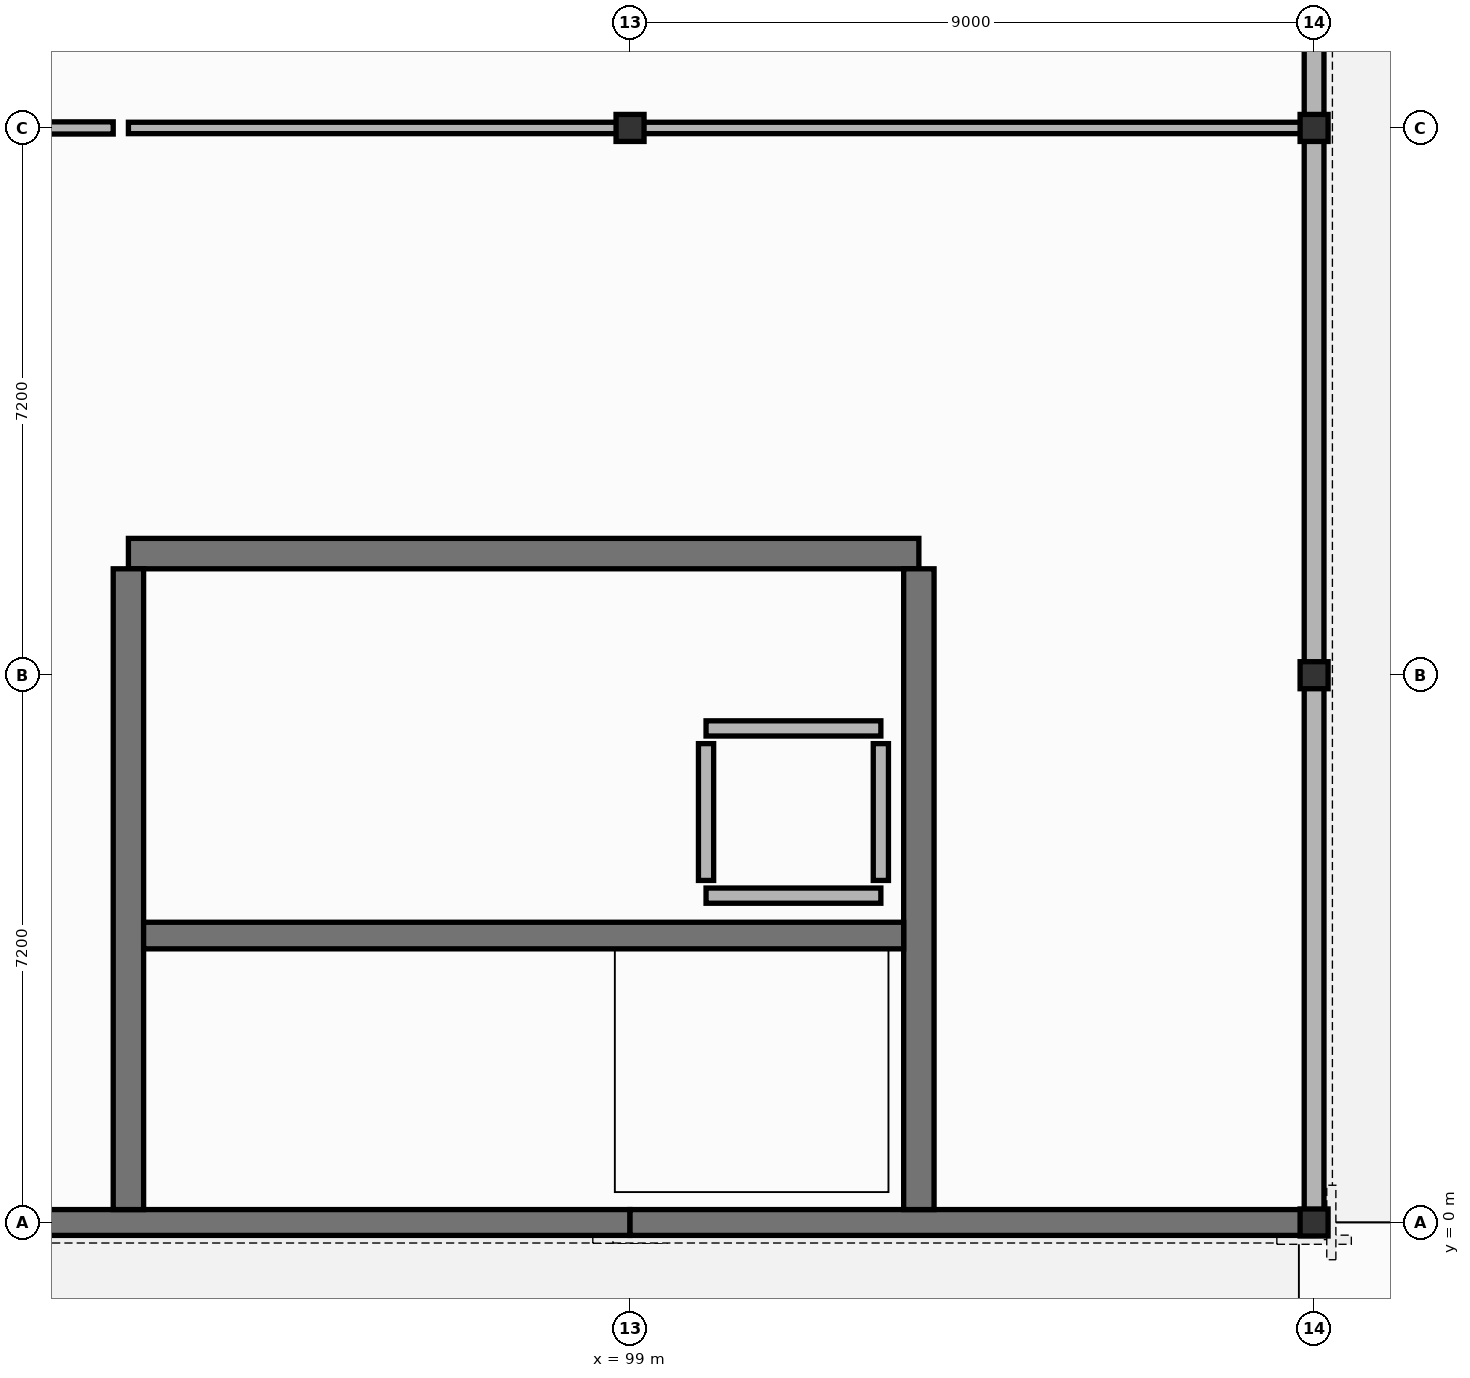
"""IFC4 building model, lengths in metres.
Left out: names, types, materials, properties, quantities, classifications, styles, units other than length and angle.
Written with IfcOpenShell. Run it as: python <this file> out.ifc"""

import sys

from ifc_helpers import new_model, si_unit, direction, frame, frame_2d, origin, origin_2d, place, context, subcontext, project, spatial, rectangle, i_section, extrude, element, fill, save


model = new_model("IFC4")
c1 = context("Model", 3, precision=1e-05, world=origin(), true_north=direction((0.0, 1.0)))
c2 = subcontext(c1, "Body", "Model", "MODEL_VIEW")
j1 = project(units=[si_unit("LENGTHUNIT", "METRE"), si_unit("PLANEANGLEUNIT", "RADIAN")], contexts=[c1])
p1 = place(None, origin())
s1 = spatial("IfcSite", under=j1, at=p1, CompositionType="ELEMENT")
p2 = place(p1, origin())
s2 = spatial("IfcBuilding", under=s1, at=p2, CompositionType="ELEMENT")
p3 = place(p2, origin())
s3 = spatial("IfcBuildingStorey", under=s2, at=p3, CompositionType="ELEMENT", Elevation=0.0)
for number, where, z_axis, x_axis in (
    (1, (99.0, 14.4, 0.0), (0.0, 0.0, 1.0), (1.0, 0.0, 0.0)),
    (2, (108.0, 0.0, 0.0), (0.0, 0.0, 1.0), (1.0, 0.0, 0.0)),
    (3, (108.0, 7.2, 0.0), (0.0, 0.0, 1.0), (1.0, 0.0, 0.0)),
    (4, (108.0, 14.4, 0.0), (0.0, 0.0, 1.0), (1.0, 0.0, 0.0)),
):
    element("IfcColumn", number, at=place(p3, frame(where, z_axis=z_axis, x_axis=x_axis)), inside=s3, PredefinedType="COLUMN", context=c2, shape_type="SweptSolid", body=[
        extrude(i_section(OverallWidth=0.368, OverallDepth=0.356, WebThickness=0.011, FlangeThickness=0.018, at=origin_2d()), origin(), (0.0, 0.0, 1.0), 5.1),
    ])
p4 = place(p3, frame((90.0, 0.0, 0.0), z_axis=(0.0, 0.0, 1.0), x_axis=(1.0, 0.0, 0.0)))
e5 = element("IfcWall", 5, at=p4, inside=s3, PredefinedType="SOLIDWALL", context=c2, shape_type="SweptSolid", body=[
    extrude(rectangle(XDim=9.0, YDim=0.34, at=frame_2d((4.5, 0.0))), origin(), (0.0, 0.0, 1.0), 4.8),
])
p5 = place(p4, frame((2.75, 0.0, 0.0)))
e6 = element("IfcOpeningElement", 6, at=p5, cuts=e5, PredefinedType="OPENING", context=c2, shape_type="SweptSolid", body=[
    extrude(rectangle(XDim=1.8, YDim=2.4, at=frame_2d((0.9, 1.2))), frame((0.0, 0.18, 0.0), z_axis=(0.0, -1.0, 0.0), x_axis=(1.0, 0.0, 0.0)), (0.0, 0.0, 1.0), 0.36),
])
p6 = place(p3, frame((99.0, 0.0, 0.0), z_axis=(0.0, 0.0, 1.0), x_axis=(1.0, 0.0, 0.0)))
e7 = element("IfcWall", 7, at=p6, inside=s3, PredefinedType="SOLIDWALL", context=c2, shape_type="SweptSolid", body=[
    extrude(rectangle(XDim=9.0, YDim=0.34, at=frame_2d((4.5, 0.0))), origin(), (0.0, 0.0, 1.0), 4.8),
])
p7 = place(p6, frame((5.2, 0.0, 0.85)))
e8 = element("IfcOpeningElement", 8, at=p7, cuts=e7, PredefinedType="OPENING", context=c2, shape_type="SweptSolid", body=[
    extrude(rectangle(XDim=1.4, YDim=1.8, at=frame_2d((0.7, 0.9))), frame((0.0, 0.18, 0.0), z_axis=(0.0, -1.0, 0.0), x_axis=(1.0, 0.0, 0.0)), (0.0, 0.0, 1.0), 0.36),
])
p8 = place(p3, frame((108.0, 0.0, 0.0), z_axis=(0.0, 0.0, 1.0), x_axis=(0.0, 1.0, 0.0)))
e9 = element("IfcWall", 9, at=p8, inside=s3, PredefinedType="SOLIDWALL", context=c2, shape_type="SweptSolid", body=[
    extrude(rectangle(XDim=21.6, YDim=0.26, at=frame_2d((10.8, 0.0))), origin(), (0.0, 0.0, 1.0), 4.363),
])
p9 = place(p8, frame((4.5, 0.0, 0.85)))
e10 = element("IfcOpeningElement", 10, at=p9, cuts=e9, PredefinedType="OPENING", context=c2, shape_type="SweptSolid", body=[
    extrude(rectangle(XDim=2.2, YDim=1.95, at=frame_2d((1.1, 0.975))), frame((0.0, 0.14, 0.0), z_axis=(0.0, -1.0, 0.0), x_axis=(1.0, 0.0, 0.0)), (0.0, 0.0, 1.0), 0.28),
])
p10 = place(p8, frame((15.4, 0.0, 0.85)))
e11 = element("IfcOpeningElement", 11, at=p10, cuts=e9, PredefinedType="OPENING", context=c2, shape_type="SweptSolid", body=[
    extrude(rectangle(XDim=1.4, YDim=1.8, at=frame_2d((0.7, 0.9))), frame((0.0, 0.14, 0.0), z_axis=(0.0, -1.0, 0.0), x_axis=(1.0, 0.0, 0.0)), (0.0, 0.0, 1.0), 0.28),
])
p11 = place(p3, frame((92.4, 8.8, 0.0), z_axis=(0.0, 0.0, 1.0), x_axis=(1.0, 0.0, 0.0)))
e12 = element("IfcWall", 12, at=p11, inside=s3, PredefinedType="SHEAR", context=c2, shape_type="SweptSolid", body=[
    extrude(rectangle(XDim=10.4, YDim=0.4, at=frame_2d((5.2, 0.0))), origin(), (0.0, 0.0, 1.0), 4.8),
])
p12 = place(p11, frame((2.4, 0.0, 0.0)))
e13 = element("IfcOpeningElement", 13, at=p12, cuts=e12, PredefinedType="OPENING", context=c2, shape_type="SweptSolid", body=[
    extrude(rectangle(XDim=1.5, YDim=2.2, at=frame_2d((0.75, 1.1))), frame((0.0, 0.21, 0.0), z_axis=(0.0, -1.0, 0.0), x_axis=(1.0, 0.0, 0.0)), (0.0, 0.0, 1.0), 0.42),
])
for number, where, z_axis, x_axis in (
    (14, (92.4, 0.17, 0.0), (0.0, 0.0, 1.0), (0.0, 1.0, 0.0)),
    (15, (102.8, 0.17, 0.0), (0.0, 0.0, 1.0), (0.0, 1.0, 0.0)),
):
    element("IfcWall", number, at=place(p3, frame(where, z_axis=z_axis, x_axis=x_axis)), inside=s3, PredefinedType="SHEAR", context=c2, shape_type="SweptSolid", body=[
        extrude(rectangle(XDim=8.43, YDim=0.4, at=frame_2d((4.215, 0.0))), origin(), (0.0, 0.0, 1.0), 4.8),
    ])
p13 = place(p3, frame((92.6, 3.775, 0.0), z_axis=(0.0, 0.0, 1.0), x_axis=(1.0, 0.0, 0.0)))
e16 = element("IfcWall", 16, at=p13, inside=s3, PredefinedType="SHEAR", context=c2, shape_type="SweptSolid", body=[
    extrude(rectangle(XDim=10.0, YDim=0.35, at=frame_2d((5.0, 0.0))), origin(), (0.0, 0.0, 1.0), 4.8),
])
p14 = place(p13, frame((0.45, 0.0, 0.0)))
e17 = element("IfcOpeningElement", 17, at=p14, cuts=e16, PredefinedType="OPENING", context=c2, shape_type="SweptSolid", body=[
    extrude(rectangle(XDim=1.05, YDim=2.2, at=frame_2d((0.525, 1.1))), frame((0.0, 0.185, 0.0), z_axis=(0.0, -1.0, 0.0), x_axis=(1.0, 0.0, 0.0)), (0.0, 0.0, 1.0), 0.37),
])
for number, where, z_axis, x_axis in (
    (18, (100.0, 4.3, 0.0), (0.0, 0.0, 1.0), (1.0, 0.0, 0.0)),
    (19, (100.0, 6.5, 0.0), (0.0, 0.0, 1.0), (1.0, 0.0, 0.0)),
):
    element("IfcWall", number, at=place(p3, frame(where, z_axis=z_axis, x_axis=x_axis)), inside=s3, PredefinedType="PARTITIONING", context=c2, shape_type="SweptSolid", body=[
        extrude(rectangle(XDim=2.3, YDim=0.2, at=frame_2d((1.15, 0.0))), origin(), (0.0, 0.0, 1.0), 4.8),
    ])
p15 = place(p3, frame((100.0, 4.5, 0.0), z_axis=(0.0, 0.0, 1.0), x_axis=(0.0, 1.0, 0.0)))
e20 = element("IfcWall", 20, at=p15, inside=s3, PredefinedType="PARTITIONING", context=c2, shape_type="SweptSolid", body=[
    extrude(rectangle(XDim=1.8, YDim=0.2, at=frame_2d((0.9, 0.0))), origin(), (0.0, 0.0, 1.0), 4.8),
])
p16 = place(p15, frame((0.45, 0.0, 0.0)))
e21 = element("IfcOpeningElement", 21, at=p16, cuts=e20, PredefinedType="OPENING", context=c2, shape_type="SweptSolid", body=[
    extrude(rectangle(XDim=0.9, YDim=2.1, at=frame_2d((0.45, 1.05))), frame((0.0, 0.11, 0.0), z_axis=(0.0, -1.0, 0.0), x_axis=(1.0, 0.0, 0.0)), (0.0, 0.0, 1.0), 0.22),
])
p17 = place(p3, frame((102.3, 4.5, 0.0), z_axis=(0.0, 0.0, 1.0), x_axis=(0.0, 1.0, 0.0)))
e22 = element("IfcWall", 22, at=p17, inside=s3, PredefinedType="PARTITIONING", context=c2, shape_type="SweptSolid", body=[
    extrude(rectangle(XDim=1.8, YDim=0.2, at=frame_2d((0.9, 0.0))), origin(), (0.0, 0.0, 1.0), 4.8),
])
p18 = place(p3, frame((54.0, 14.4, 0.0), z_axis=(0.0, 0.0, 1.0), x_axis=(1.0, 0.0, 0.0)))
e23 = element("IfcWall", 23, at=p18, inside=s3, PredefinedType="PARTITIONING", context=c2, shape_type="SweptSolid", body=[
    extrude(rectangle(XDim=38.2, YDim=0.16, at=frame_2d((19.1, 0.0))), origin(), (0.0, 0.0, 1.0), 3.898),
])
p19 = place(p18, frame((3.6, 0.0, 0.0)))
e24 = element("IfcOpeningElement", 24, at=p19, cuts=e23, PredefinedType="OPENING", context=c2, shape_type="SweptSolid", body=[
    extrude(rectangle(XDim=1.6, YDim=2.2, at=frame_2d((0.8, 1.1))), frame((0.0, 0.09, 0.0), z_axis=(0.0, -1.0, 0.0), x_axis=(1.0, 0.0, 0.0)), (0.0, 0.0, 1.0), 0.18),
])
p20 = place(p18, frame((21.6, 0.0, 0.0)))
e25 = element("IfcOpeningElement", 25, at=p20, cuts=e23, PredefinedType="OPENING", context=c2, shape_type="SweptSolid", body=[
    extrude(rectangle(XDim=1.6, YDim=2.2, at=frame_2d((0.8, 1.1))), frame((0.0, 0.09, 0.0), z_axis=(0.0, -1.0, 0.0), x_axis=(1.0, 0.0, 0.0)), (0.0, 0.0, 1.0), 0.18),
])
p21 = place(p3, frame((92.4, 14.4, 0.0), z_axis=(0.0, 0.0, 1.0), x_axis=(1.0, 0.0, 0.0)))
e26 = element("IfcWall", 26, at=p21, inside=s3, PredefinedType="PARTITIONING", context=c2, shape_type="SweptSolid", body=[
    extrude(rectangle(XDim=15.6, YDim=0.15, at=frame_2d((7.8, 0.0))), origin(), (0.0, 0.0, 1.0), 4.208),
])
p22 = place(p21, frame((4.5, 0.0, 0.0)))
e27 = element("IfcOpeningElement", 27, at=p22, cuts=e26, PredefinedType="OPENING", context=c2, shape_type="SweptSolid", body=[
    extrude(rectangle(XDim=1.0, YDim=2.15, at=frame_2d((0.5, 1.075))), frame((0.0, 0.085, 0.0), z_axis=(0.0, -1.0, 0.0), x_axis=(1.0, 0.0, 0.0)), (0.0, 0.0, 1.0), 0.17),
])
p23 = place(p21, frame((11.8, 0.0, 0.0)))
e28 = element("IfcOpeningElement", 28, at=p23, cuts=e26, PredefinedType="OPENING", context=c2, shape_type="SweptSolid", body=[
    extrude(rectangle(XDim=0.95, YDim=2.15, at=frame_2d((0.475, 1.075))), frame((0.0, 0.085, 0.0), z_axis=(0.0, -1.0, 0.0), x_axis=(1.0, 0.0, 0.0)), (0.0, 0.0, 1.0), 0.17),
])
p24 = place(p5, frame((1.8, 0.0, 0.0), z_axis=(0.0, 0.0, 1.0), x_axis=(-1.0, 0.0, 0.0)))
e29 = element("IfcDoor", 29, at=p24, inside=s3, OperationType="DOUBLE_DOOR_SINGLE_SWING", PredefinedType="DOOR", context=c2, shape_type="SweptSolid", body=[
    extrude(rectangle(XDim=1.8, YDim=2.4, at=frame_2d((0.9, 1.2))), frame((0.0, 0.025, 0.0), z_axis=(0.0, -1.0, 0.0), x_axis=(1.0, 0.0, 0.0)), (0.0, 0.0, 1.0), 0.05),
])
fill(e6, e29)
p25 = place(p7, origin())
e30 = element("IfcWindow", 30, at=p25, inside=s3, PartitioningType="SINGLE_PANEL", PredefinedType="WINDOW", context=c2, shape_type="SweptSolid", body=[
    extrude(rectangle(XDim=1.4, YDim=1.8, at=frame_2d((0.7, 0.9))), frame((0.0, 0.03, 0.0), z_axis=(0.0, -1.0, 0.0), x_axis=(1.0, 0.0, 0.0)), (0.0, 0.0, 1.0), 0.06),
])
fill(e8, e30)
p26 = place(p9, origin())
e31 = element("IfcWindow", 31, at=p26, inside=s3, PartitioningType="SINGLE_PANEL", PredefinedType="WINDOW", context=c2, shape_type="SweptSolid", body=[
    extrude(rectangle(XDim=2.2, YDim=1.95, at=frame_2d((1.1, 0.975))), frame((0.0, 0.03, 0.0), z_axis=(0.0, -1.0, 0.0), x_axis=(1.0, 0.0, 0.0)), (0.0, 0.0, 1.0), 0.06),
])
fill(e10, e31)
p27 = place(p12, origin())
e32 = element("IfcDoor", 32, at=p27, inside=s3, OperationType="DOUBLE_DOOR_SINGLE_SWING", PredefinedType="DOOR", context=c2, shape_type="SweptSolid", body=[
    extrude(rectangle(XDim=1.5, YDim=2.2, at=frame_2d((0.75, 1.1))), frame((0.0, 0.025, 0.0), z_axis=(0.0, -1.0, 0.0), x_axis=(1.0, 0.0, 0.0)), (0.0, 0.0, 1.0), 0.05),
])
fill(e13, e32)
p28 = place(p14, origin())
e33 = element("IfcDoor", 33, at=p28, inside=s3, OperationType="SINGLE_SWING_LEFT", PredefinedType="DOOR", context=c2, shape_type="SweptSolid", body=[
    extrude(rectangle(XDim=1.05, YDim=2.2, at=frame_2d((0.525, 1.1))), frame((0.0, 0.025, 0.0), z_axis=(0.0, -1.0, 0.0), x_axis=(1.0, 0.0, 0.0)), (0.0, 0.0, 1.0), 0.05),
])
fill(e17, e33)
p29 = place(p16, origin())
e34 = element("IfcDoor", 34, at=p29, inside=s3, OperationType="SINGLE_SWING_LEFT", PredefinedType="DOOR", context=c2, shape_type="SweptSolid", body=[
    extrude(rectangle(XDim=0.9, YDim=2.1, at=frame_2d((0.45, 1.05))), frame((0.0, 0.025, 0.0), z_axis=(0.0, -1.0, 0.0), x_axis=(1.0, 0.0, 0.0)), (0.0, 0.0, 1.0), 0.05),
])
fill(e21, e34)
p30 = place(p22, origin())
e35 = element("IfcDoor", 35, at=p30, inside=s3, OperationType="SINGLE_SWING_RIGHT", PredefinedType="DOOR", context=c2, shape_type="SweptSolid", body=[
    extrude(rectangle(XDim=1.0, YDim=2.15, at=frame_2d((0.5, 1.075))), frame((0.0, 0.025, 0.0), z_axis=(0.0, -1.0, 0.0), x_axis=(1.0, 0.0, 0.0)), (0.0, 0.0, 1.0), 0.05),
])
fill(e27, e35)
p31 = place(p23, origin())
e36 = element("IfcDoor", 36, at=p31, inside=s3, OperationType="SINGLE_SWING_LEFT", PredefinedType="DOOR", context=c2, shape_type="SweptSolid", body=[
    extrude(rectangle(XDim=0.95, YDim=2.15, at=frame_2d((0.475, 1.075))), frame((0.0, 0.025, 0.0), z_axis=(0.0, -1.0, 0.0), x_axis=(1.0, 0.0, 0.0)), (0.0, 0.0, 1.0), 0.05),
])
fill(e28, e36)
save(model, sys.argv[1])
